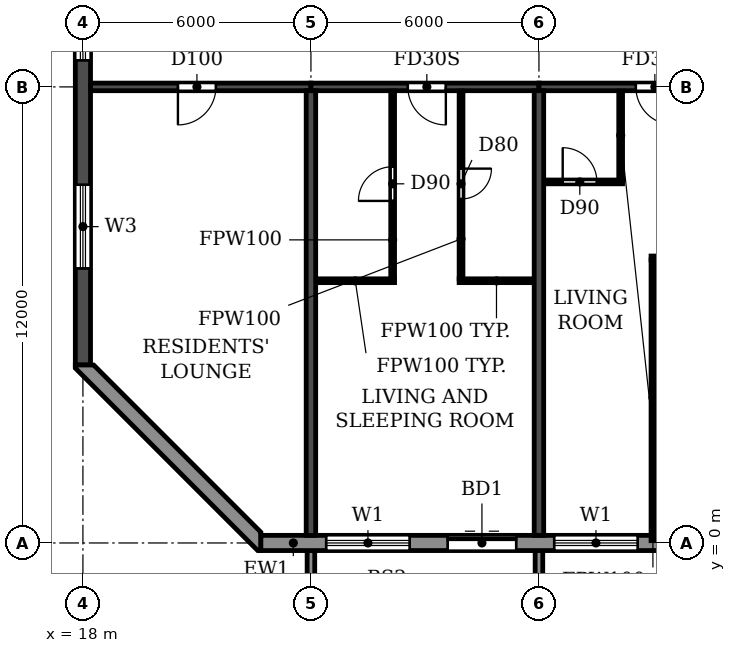
"""IFC4 building model, lengths in metres.
Left out: names, types, materials, properties, quantities, classifications, styles, units other than length and angle.
Written with IfcOpenShell. Run it as: python <this file> out.ifc"""

import sys

from ifc_helpers import new_model, si_unit, direction, frame, frame_2d, origin, place, context, subcontext, project, spatial, polyline, rectangle, outline, extrude, source, transform, mapped, element, fill, save


model = new_model("IFC4")
c1 = context("Model", 3, precision=1e-05, world=origin(), true_north=direction((0.0, 1.0)))
c2 = subcontext(c1, "Body", "Model", "MODEL_VIEW")
j1 = project(units=[si_unit("LENGTHUNIT", "METRE"), si_unit("PLANEANGLEUNIT", "RADIAN")], contexts=[c1])
p1 = place(None, origin())
s1 = spatial("IfcSite", under=j1, at=p1, CompositionType="ELEMENT")
p2 = place(p1, origin())
s2 = spatial("IfcBuilding", under=s1, at=p2, CompositionType="ELEMENT")
p3 = place(p2, frame((0.0, 0.0, 181.8)))
s3 = spatial("IfcBuildingStorey", under=s2, at=p3, CompositionType="ELEMENT", Elevation=181.8)
for number, where, z_axis, x_axis in (
    (1, (24.0, 0.2, 0.0), (0.0, 0.0, 1.0), (0.0, 1.0, 0.0)),
    (2, (30.0, 0.2, 0.0), (0.0, 0.0, 1.0), (0.0, 1.0, 0.0)),
):
    element("IfcWall", number, at=place(p3, frame(where, z_axis=z_axis, x_axis=x_axis)), inside=s3, PredefinedType="SHEAR", context=c2, shape_type="SweptSolid", body=[
        extrude(rectangle(XDim=11.7, YDim=0.25, at=frame_2d((5.85, 0.0))), origin(), (0.0, 0.0, 1.0), 3.08),
    ])
p4 = place(p3, frame((18.0, 4.683, 0.0), z_axis=(0.0, 0.0, 1.0), x_axis=(0.0, 1.0, 0.0)))
e3 = element("IfcWall", 3, at=p4, inside=s3, PredefinedType="SHEAR", context=c2, shape_type="SweptSolid", body=[
    extrude(rectangle(XDim=31.834, YDim=0.4, at=frame_2d((15.917, 0.0))), origin(), (0.0, 0.0, 1.0), 3.08),
])
p5 = place(p4, frame((23.817, 0.0, 0.9)))
e4 = element("IfcOpeningElement", 4, at=p5, cuts=e3, PredefinedType="OPENING", context=c2, shape_type="SweptSolid", body=[
    extrude(rectangle(XDim=1.2, YDim=1.5, at=frame_2d((0.6, 0.75))), frame((0.0, 0.21, 0.0), z_axis=(0.0, -1.0, 0.0), x_axis=(1.0, 0.0, 0.0)), (0.0, 0.0, 1.0), 0.42),
])
p6 = place(p4, frame((8.017, 0.0, 0.9)))
e5 = element("IfcOpeningElement", 5, at=p6, cuts=e3, PredefinedType="OPENING", context=c2, shape_type="SweptSolid", body=[
    extrude(rectangle(XDim=1.2, YDim=1.5, at=frame_2d((0.6, 0.75))), frame((0.0, 0.21, 0.0), z_axis=(0.0, -1.0, 0.0), x_axis=(1.0, 0.0, 0.0)), (0.0, 0.0, 1.0), 0.42),
])
p7 = place(p4, frame((27.694, 0.0, 0.6)))
e6 = element("IfcOpeningElement", 6, at=p7, cuts=e3, PredefinedType="OPENING", context=c2, shape_type="SweptSolid", body=[
    extrude(rectangle(XDim=2.2, YDim=1.8, at=frame_2d((1.1, 0.9))), frame((0.0, 0.21, 0.0), z_axis=(0.0, -1.0, 0.0), x_axis=(1.0, 0.0, 0.0)), (0.0, 0.0, 1.0), 0.42),
])
p8 = place(p4, frame((2.541, 0.0, 0.6)))
e7 = element("IfcOpeningElement", 7, at=p8, cuts=e3, PredefinedType="OPENING", context=c2, shape_type="SweptSolid", body=[
    extrude(rectangle(XDim=2.2, YDim=1.8, at=frame_2d((1.1, 0.9))), frame((0.0, 0.21, 0.0), z_axis=(0.0, -1.0, 0.0), x_axis=(1.0, 0.0, 0.0)), (0.0, 0.0, 1.0), 0.42),
])
p9 = place(p4, frame((15.917, 0.0, 0.9)))
e8 = element("IfcOpeningElement", 8, at=p9, cuts=e3, PredefinedType="OPENING", context=c2, shape_type="SweptSolid", body=[
    extrude(rectangle(XDim=1.2, YDim=1.5, at=frame_2d((0.6, 0.75))), frame((0.0, 0.21, 0.0), z_axis=(0.0, -1.0, 0.0), x_axis=(1.0, 0.0, 0.0)), (0.0, 0.0, 1.0), 0.42),
])
p10 = place(p3, frame((18.2, 12.0, 0.0), z_axis=(0.0, 0.0, 1.0), x_axis=(1.0, 0.0, 0.0)))
e9 = element("IfcWall", 9, at=p10, inside=s3, PredefinedType="SHEAR", context=c2, shape_type="SweptSolid", body=[
    extrude(rectangle(XDim=5.8, YDim=0.2, at=frame_2d((2.9, 0.0))), origin(), (0.0, 0.0, 1.0), 2.48),
])
p11 = place(p10, frame((2.3, 0.0, 0.0)))
e10 = element("IfcOpeningElement", 10, at=p11, cuts=e9, PredefinedType="OPENING", context=c2, shape_type="SweptSolid", body=[
    extrude(rectangle(XDim=1.0, YDim=2.1, at=frame_2d((0.5, 1.05))), frame((0.0, 0.11, 0.0), z_axis=(0.0, -1.0, 0.0), x_axis=(1.0, 0.0, 0.0)), (0.0, 0.0, 1.0), 0.22),
])
p12 = place(p3, frame((24.0, 12.0, 0.0), z_axis=(0.0, 0.0, 1.0), x_axis=(1.0, 0.0, 0.0)))
e11 = element("IfcWall", 11, at=p12, inside=s3, PredefinedType="SHEAR", context=c2, shape_type="SweptSolid", body=[
    extrude(rectangle(XDim=6.0, YDim=0.2, at=frame_2d((3.0, 0.0))), origin(), (0.0, 0.0, 1.0), 2.48),
])
p13 = place(p12, frame((2.55, 0.0, 0.0)))
e12 = element("IfcOpeningElement", 12, at=p13, cuts=e11, PredefinedType="OPENING", context=c2, shape_type="SweptSolid", body=[
    extrude(rectangle(XDim=1.0, YDim=2.1, at=frame_2d((0.5, 1.05))), frame((0.0, 0.11, 0.0), z_axis=(0.0, -1.0, 0.0), x_axis=(1.0, 0.0, 0.0)), (0.0, 0.0, 1.0), 0.22),
])
p14 = place(p3, frame((30.0, 12.0, 0.0), z_axis=(0.0, 0.0, 1.0), x_axis=(1.0, 0.0, 0.0)))
e13 = element("IfcWall", 13, at=p14, inside=s3, PredefinedType="SHEAR", context=c2, shape_type="SweptSolid", body=[
    extrude(rectangle(XDim=6.0, YDim=0.2, at=frame_2d((3.0, 0.0))), origin(), (0.0, 0.0, 1.0), 2.48),
])
p15 = place(p14, frame((2.55, 0.0, 0.0)))
e14 = element("IfcOpeningElement", 14, at=p15, cuts=e13, PredefinedType="OPENING", context=c2, shape_type="SweptSolid", body=[
    extrude(rectangle(XDim=1.0, YDim=2.1, at=frame_2d((0.5, 1.05))), frame((0.0, 0.11, 0.0), z_axis=(0.0, -1.0, 0.0), x_axis=(1.0, 0.0, 0.0)), (0.0, 0.0, 1.0), 0.22),
])
p16 = place(p3, frame((22.683, 0.0, 0.0), z_axis=(0.0, 0.0, 1.0), x_axis=(1.0, 0.0, 0.0)))
e15 = element("IfcWall", 15, at=p16, inside=s3, PredefinedType="STANDARD", context=c2, shape_type="SweptSolid", body=[
    extrude(rectangle(XDim=56.634, YDim=0.4, at=frame_2d((28.317, 0.0))), origin(), (0.0, 0.0, 1.0), 3.08),
])
p17 = place(p16, frame((1.717, 0.0, 0.9)))
e16 = element("IfcOpeningElement", 16, at=p17, cuts=e15, PredefinedType="OPENING", context=c2, shape_type="SweptSolid", body=[
    extrude(rectangle(XDim=2.2, YDim=1.5, at=frame_2d((1.1, 0.75))), frame((0.0, 0.21, 0.0), z_axis=(0.0, -1.0, 0.0), x_axis=(1.0, 0.0, 0.0)), (0.0, 0.0, 1.0), 0.42),
])
p18 = place(p16, frame((4.917, 0.0, 0.0)))
e17 = element("IfcOpeningElement", 17, at=p18, cuts=e15, PredefinedType="OPENING", context=c2, shape_type="SweptSolid", body=[
    extrude(rectangle(XDim=1.8, YDim=2.4, at=frame_2d((0.9, 1.2))), frame((0.0, 0.21, 0.0), z_axis=(0.0, -1.0, 0.0), x_axis=(1.0, 0.0, 0.0)), (0.0, 0.0, 1.0), 0.42),
])
p19 = place(p16, frame((7.717, 0.0, 0.9)))
e18 = element("IfcOpeningElement", 18, at=p19, cuts=e15, PredefinedType="OPENING", context=c2, shape_type="SweptSolid", body=[
    extrude(rectangle(XDim=2.2, YDim=1.5, at=frame_2d((1.1, 0.75))), frame((0.0, 0.21, 0.0), z_axis=(0.0, -1.0, 0.0), x_axis=(1.0, 0.0, 0.0)), (0.0, 0.0, 1.0), 0.42),
])
p20 = place(p16, frame((10.717, 0.0, 0.9)))
e19 = element("IfcOpeningElement", 19, at=p20, cuts=e15, PredefinedType="OPENING", context=c2, shape_type="SweptSolid", body=[
    extrude(rectangle(XDim=2.2, YDim=1.5, at=frame_2d((1.1, 0.75))), frame((0.0, 0.21, 0.0), z_axis=(0.0, -1.0, 0.0), x_axis=(1.0, 0.0, 0.0)), (0.0, 0.0, 1.0), 0.42),
])
p21 = place(p16, frame((13.717, 0.0, 0.9)))
e20 = element("IfcOpeningElement", 20, at=p21, cuts=e15, PredefinedType="OPENING", context=c2, shape_type="SweptSolid", body=[
    extrude(rectangle(XDim=2.2, YDim=1.5, at=frame_2d((1.1, 0.75))), frame((0.0, 0.21, 0.0), z_axis=(0.0, -1.0, 0.0), x_axis=(1.0, 0.0, 0.0)), (0.0, 0.0, 1.0), 0.42),
])
p22 = place(p16, frame((16.717, 0.0, 0.9)))
e21 = element("IfcOpeningElement", 21, at=p22, cuts=e15, PredefinedType="OPENING", context=c2, shape_type="SweptSolid", body=[
    extrude(rectangle(XDim=2.2, YDim=1.5, at=frame_2d((1.1, 0.75))), frame((0.0, 0.21, 0.0), z_axis=(0.0, -1.0, 0.0), x_axis=(1.0, 0.0, 0.0)), (0.0, 0.0, 1.0), 0.42),
])
p23 = place(p16, frame((19.717, 0.0, 0.9)))
e22 = element("IfcOpeningElement", 22, at=p23, cuts=e15, PredefinedType="OPENING", context=c2, shape_type="SweptSolid", body=[
    extrude(rectangle(XDim=2.2, YDim=1.5, at=frame_2d((1.1, 0.75))), frame((0.0, 0.21, 0.0), z_axis=(0.0, -1.0, 0.0), x_axis=(1.0, 0.0, 0.0)), (0.0, 0.0, 1.0), 0.42),
])
p24 = place(p16, frame((22.717, 0.0, 0.9)))
e23 = element("IfcOpeningElement", 23, at=p24, cuts=e15, PredefinedType="OPENING", context=c2, shape_type="SweptSolid", body=[
    extrude(rectangle(XDim=2.2, YDim=1.5, at=frame_2d((1.1, 0.75))), frame((0.0, 0.21, 0.0), z_axis=(0.0, -1.0, 0.0), x_axis=(1.0, 0.0, 0.0)), (0.0, 0.0, 1.0), 0.42),
])
p25 = place(p16, frame((25.717, 0.0, 0.9)))
e24 = element("IfcOpeningElement", 24, at=p25, cuts=e15, PredefinedType="OPENING", context=c2, shape_type="SweptSolid", body=[
    extrude(rectangle(XDim=2.2, YDim=1.5, at=frame_2d((1.1, 0.75))), frame((0.0, 0.21, 0.0), z_axis=(0.0, -1.0, 0.0), x_axis=(1.0, 0.0, 0.0)), (0.0, 0.0, 1.0), 0.42),
])
p26 = place(p16, frame((28.717, 0.0, 0.9)))
e25 = element("IfcOpeningElement", 25, at=p26, cuts=e15, PredefinedType="OPENING", context=c2, shape_type="SweptSolid", body=[
    extrude(rectangle(XDim=2.2, YDim=1.5, at=frame_2d((1.1, 0.75))), frame((0.0, 0.21, 0.0), z_axis=(0.0, -1.0, 0.0), x_axis=(1.0, 0.0, 0.0)), (0.0, 0.0, 1.0), 0.42),
])
p27 = place(p16, frame((31.717, 0.0, 0.9)))
e26 = element("IfcOpeningElement", 26, at=p27, cuts=e15, PredefinedType="OPENING", context=c2, shape_type="SweptSolid", body=[
    extrude(rectangle(XDim=2.2, YDim=1.5, at=frame_2d((1.1, 0.75))), frame((0.0, 0.21, 0.0), z_axis=(0.0, -1.0, 0.0), x_axis=(1.0, 0.0, 0.0)), (0.0, 0.0, 1.0), 0.42),
])
p28 = place(p16, frame((34.717, 0.0, 0.9)))
e27 = element("IfcOpeningElement", 27, at=p28, cuts=e15, PredefinedType="OPENING", context=c2, shape_type="SweptSolid", body=[
    extrude(rectangle(XDim=2.2, YDim=1.5, at=frame_2d((1.1, 0.75))), frame((0.0, 0.21, 0.0), z_axis=(0.0, -1.0, 0.0), x_axis=(1.0, 0.0, 0.0)), (0.0, 0.0, 1.0), 0.42),
])
p29 = place(p16, frame((37.917, 0.0, 0.0)))
e28 = element("IfcOpeningElement", 28, at=p29, cuts=e15, PredefinedType="OPENING", context=c2, shape_type="SweptSolid", body=[
    extrude(rectangle(XDim=1.8, YDim=2.4, at=frame_2d((0.9, 1.2))), frame((0.0, 0.21, 0.0), z_axis=(0.0, -1.0, 0.0), x_axis=(1.0, 0.0, 0.0)), (0.0, 0.0, 1.0), 0.42),
])
p30 = place(p16, frame((40.717, 0.0, 0.9)))
e29 = element("IfcOpeningElement", 29, at=p30, cuts=e15, PredefinedType="OPENING", context=c2, shape_type="SweptSolid", body=[
    extrude(rectangle(XDim=2.2, YDim=1.5, at=frame_2d((1.1, 0.75))), frame((0.0, 0.21, 0.0), z_axis=(0.0, -1.0, 0.0), x_axis=(1.0, 0.0, 0.0)), (0.0, 0.0, 1.0), 0.42),
])
p31 = place(p16, frame((43.717, 0.0, 0.9)))
e30 = element("IfcOpeningElement", 30, at=p31, cuts=e15, PredefinedType="OPENING", context=c2, shape_type="SweptSolid", body=[
    extrude(rectangle(XDim=2.2, YDim=1.5, at=frame_2d((1.1, 0.75))), frame((0.0, 0.21, 0.0), z_axis=(0.0, -1.0, 0.0), x_axis=(1.0, 0.0, 0.0)), (0.0, 0.0, 1.0), 0.42),
])
p32 = place(p16, frame((46.717, 0.0, 0.9)))
e31 = element("IfcOpeningElement", 31, at=p32, cuts=e15, PredefinedType="OPENING", context=c2, shape_type="SweptSolid", body=[
    extrude(rectangle(XDim=2.2, YDim=1.5, at=frame_2d((1.1, 0.75))), frame((0.0, 0.21, 0.0), z_axis=(0.0, -1.0, 0.0), x_axis=(1.0, 0.0, 0.0)), (0.0, 0.0, 1.0), 0.42),
])
p33 = place(p16, frame((49.917, 0.0, 0.0)))
e32 = element("IfcOpeningElement", 32, at=p33, cuts=e15, PredefinedType="OPENING", context=c2, shape_type="SweptSolid", body=[
    extrude(rectangle(XDim=1.8, YDim=2.4, at=frame_2d((0.9, 1.2))), frame((0.0, 0.21, 0.0), z_axis=(0.0, -1.0, 0.0), x_axis=(1.0, 0.0, 0.0)), (0.0, 0.0, 1.0), 0.42),
])
p34 = place(p16, frame((52.717, 0.0, 0.9)))
e33 = element("IfcOpeningElement", 33, at=p34, cuts=e15, PredefinedType="OPENING", context=c2, shape_type="SweptSolid", body=[
    extrude(rectangle(XDim=2.2, YDim=1.5, at=frame_2d((1.1, 0.75))), frame((0.0, 0.21, 0.0), z_axis=(0.0, -1.0, 0.0), x_axis=(1.0, 0.0, 0.0)), (0.0, 0.0, 1.0), 0.42),
])
p35 = place(p3, origin())
e34 = element("IfcWall", 34, at=p35, inside=s3, PredefinedType="STANDARD", context=c2, shape_type="SweptSolid", body=[
    extrude(outline(polyline([(17.8, 4.683), (17.8, 4.6), (22.6, -0.2), (22.683, -0.2), (22.683, 0.283), (18.283, 4.683), (17.8, 4.683)])), origin(), (0.0, 0.0, 1.0), 3.08),
])
m1 = source(origin(), c2, "Body", "SweptSolid", [
    extrude(outline(polyline([(0.0, 0.0), (0.2, 0.0), (0.2, 1.65), (0.0, 1.65), (0.0, 0.0)])), origin(), (0.0, 0.0, 1.0), 3.1),
])
for number, where in (
    (35, (23.9, -1.85, 0.0)),
    (36, (29.9, -1.85, 0.0)),
):
    element("IfcWall", number, at=place(p3, frame(where)), inside=s3, PredefinedType="STANDARD", context=c2, shape_type="MappedRepresentation", body=[
        mapped(m1, transform((0.0, 0.0, 0.0))),
    ])
p36 = place(p3, frame((24.135, 6.9, 0.0), z_axis=(0.0, 0.0, 1.0), x_axis=(1.0, 0.0, 0.0)))
e37 = element("IfcWall", 37, at=p36, inside=s3, PredefinedType="PARTITIONING", context=c2, shape_type="SweptSolid", body=[
    extrude(rectangle(XDim=2.065, YDim=0.1, at=frame_2d((1.032, 0.0))), origin(), (0.0, 0.0, 1.0), 3.08),
])
p37 = place(p3, frame((27.9, 6.9, 0.0), z_axis=(0.0, 0.0, 1.0), x_axis=(1.0, 0.0, 0.0)))
e38 = element("IfcWall", 38, at=p37, inside=s3, PredefinedType="PARTITIONING", context=c2, shape_type="SweptSolid", body=[
    extrude(rectangle(XDim=1.965, YDim=0.1, at=frame_2d((0.982, 0.0))), origin(), (0.0, 0.0, 1.0), 3.08),
])
p38 = place(p3, frame((32.95, 7.5, 0.0), z_axis=(0.0, 0.0, 1.0), x_axis=(1.0, 0.0, 0.0)))
e39 = element("IfcWall", 39, at=p38, inside=s3, PredefinedType="PARTITIONING", context=c2, shape_type="SweptSolid", body=[
    extrude(rectangle(XDim=2.915, YDim=0.1, at=frame_2d((1.458, 0.0))), origin(), (0.0, 0.0, 1.0), 3.08),
])
p39 = place(p38, frame((1.65, 0.0, 0.0)))
e40 = element("IfcOpeningElement", 40, at=p39, cuts=e39, PredefinedType="OPENING", context=c2, shape_type="SweptSolid", body=[
    extrude(rectangle(XDim=0.9, YDim=2.1, at=frame_2d((0.45, 1.05))), frame((0.0, 0.06, 0.0), z_axis=(0.0, -1.0, 0.0), x_axis=(1.0, 0.0, 0.0)), (0.0, 0.0, 1.0), 0.12),
])
p40 = place(p3, frame((30.135, 9.5, 0.0), z_axis=(0.0, 0.0, 1.0), x_axis=(1.0, 0.0, 0.0)))
e41 = element("IfcWall", 41, at=p40, inside=s3, PredefinedType="PARTITIONING", context=c2, shape_type="SweptSolid", body=[
    extrude(rectangle(XDim=2.065, YDim=0.1, at=frame_2d((1.032, 0.0))), origin(), (0.0, 0.0, 1.0), 3.08),
])
p41 = place(p40, frame((0.49, 0.0, 0.0)))
e42 = element("IfcOpeningElement", 42, at=p41, cuts=e41, PredefinedType="OPENING", context=c2, shape_type="SweptSolid", body=[
    extrude(rectangle(XDim=0.9, YDim=2.1, at=frame_2d((0.45, 1.05))), frame((0.0, 0.06, 0.0), z_axis=(0.0, -1.0, 0.0), x_axis=(1.0, 0.0, 0.0)), (0.0, 0.0, 1.0), 0.12),
])
p42 = place(p3, frame((26.15, 6.95, 0.0), z_axis=(0.0, 0.0, 1.0), x_axis=(0.0, 1.0, 0.0)))
e43 = element("IfcWall", 43, at=p42, inside=s3, PredefinedType="PARTITIONING", context=c2, shape_type="SweptSolid", body=[
    extrude(rectangle(XDim=4.94, YDim=0.1, at=frame_2d((2.47, 0.0))), origin(), (0.0, 0.0, 1.0), 3.08),
])
p43 = place(p42, frame((2.05, 0.0, 0.0)))
e44 = element("IfcOpeningElement", 44, at=p43, cuts=e43, PredefinedType="OPENING", context=c2, shape_type="SweptSolid", body=[
    extrude(rectangle(XDim=0.9, YDim=2.1, at=frame_2d((0.45, 1.05))), frame((0.0, 0.06, 0.0), z_axis=(0.0, -1.0, 0.0), x_axis=(1.0, 0.0, 0.0)), (0.0, 0.0, 1.0), 0.12),
])
p44 = place(p3, frame((27.95, 6.95, 0.0), z_axis=(0.0, 0.0, 1.0), x_axis=(0.0, 1.0, 0.0)))
e45 = element("IfcWall", 45, at=p44, inside=s3, PredefinedType="PARTITIONING", context=c2, shape_type="SweptSolid", body=[
    extrude(rectangle(XDim=4.94, YDim=0.1, at=frame_2d((2.47, 0.0))), origin(), (0.0, 0.0, 1.0), 3.08),
])
p45 = place(p44, frame((2.1, 0.0, 0.0)))
e46 = element("IfcOpeningElement", 46, at=p45, cuts=e45, PredefinedType="OPENING", context=c2, shape_type="SweptSolid", body=[
    extrude(rectangle(XDim=0.8, YDim=2.1, at=frame_2d((0.4, 1.05))), frame((0.0, 0.06, 0.0), z_axis=(0.0, -1.0, 0.0), x_axis=(1.0, 0.0, 0.0)), (0.0, 0.0, 1.0), 0.12),
])
p46 = place(p3, frame((32.15, 9.55, 0.0), z_axis=(0.0, 0.0, 1.0), x_axis=(0.0, 1.0, 0.0)))
e47 = element("IfcWall", 47, at=p46, inside=s3, PredefinedType="PARTITIONING", context=c2, shape_type="SweptSolid", body=[
    extrude(rectangle(XDim=2.34, YDim=0.1, at=frame_2d((1.17, 0.0))), origin(), (0.0, 0.0, 1.0), 3.08),
])
p47 = place(p3, frame((33.0, 0.06, 0.0), z_axis=(0.0, 0.0, 1.0), x_axis=(0.0, 1.0, 0.0)))
e48 = element("IfcWall", 48, at=p47, inside=s3, PredefinedType="PARTITIONING", context=c2, shape_type="SweptSolid", body=[
    extrude(rectangle(XDim=7.39, YDim=0.1, at=frame_2d((3.695, 0.0))), origin(), (0.0, 0.0, 1.0), 3.08),
])
p48 = place(p17, origin())
e49 = element("IfcWindow", 49, at=p48, inside=s3, PartitioningType="DOUBLE_PANEL_HORIZONTAL", PredefinedType="WINDOW", context=c2, shape_type="SweptSolid", body=[
    extrude(rectangle(XDim=2.2, YDim=1.5, at=frame_2d((1.1, 0.75))), frame((0.0, 0.03, 0.0), z_axis=(0.0, -1.0, 0.0), x_axis=(1.0, 0.0, 0.0)), (0.0, 0.0, 1.0), 0.06),
])
fill(e16, e49)
p49 = place(p18, origin())
e50 = element("IfcDoor", 50, at=p49, inside=s3, OperationType="DOUBLE_DOOR_SLIDING", PredefinedType="DOOR", context=c2, shape_type="SweptSolid", body=[
    extrude(rectangle(XDim=1.8, YDim=2.4, at=frame_2d((0.9, 1.2))), frame((0.0, 0.025, 0.0), z_axis=(0.0, -1.0, 0.0), x_axis=(1.0, 0.0, 0.0)), (0.0, 0.0, 1.0), 0.05),
])
fill(e17, e50)
p50 = place(p19, origin())
e51 = element("IfcWindow", 51, at=p50, inside=s3, PartitioningType="DOUBLE_PANEL_HORIZONTAL", PredefinedType="WINDOW", context=c2, shape_type="SweptSolid", body=[
    extrude(rectangle(XDim=2.2, YDim=1.5, at=frame_2d((1.1, 0.75))), frame((0.0, 0.03, 0.0), z_axis=(0.0, -1.0, 0.0), x_axis=(1.0, 0.0, 0.0)), (0.0, 0.0, 1.0), 0.06),
])
fill(e18, e51)
p51 = place(p6, origin())
e52 = element("IfcWindow", 52, at=p51, inside=s3, PartitioningType="SINGLE_PANEL", PredefinedType="WINDOW", context=c2, shape_type="SweptSolid", body=[
    extrude(rectangle(XDim=1.2, YDim=1.5, at=frame_2d((0.6, 0.75))), frame((0.0, 0.03, 0.0), z_axis=(0.0, -1.0, 0.0), x_axis=(1.0, 0.0, 0.0)), (0.0, 0.0, 1.0), 0.06),
])
fill(e5, e52)
p52 = place(p8, origin())
e53 = element("IfcWindow", 53, at=p52, inside=s3, PartitioningType="DOUBLE_PANEL_HORIZONTAL", PredefinedType="WINDOW", context=c2, shape_type="SweptSolid", body=[
    extrude(rectangle(XDim=2.2, YDim=1.8, at=frame_2d((1.1, 0.9))), frame((0.0, 0.03, 0.0), z_axis=(0.0, -1.0, 0.0), x_axis=(1.0, 0.0, 0.0)), (0.0, 0.0, 1.0), 0.06),
])
fill(e7, e53)
p53 = place(p11, frame((1.0, 0.0, 0.0), z_axis=(0.0, 0.0, 1.0), x_axis=(-1.0, 0.0, 0.0)))
e54 = element("IfcDoor", 54, at=p53, inside=s3, OperationType="SINGLE_SWING_RIGHT", PredefinedType="DOOR", context=c2, shape_type="SweptSolid", body=[
    extrude(rectangle(XDim=1.0, YDim=2.1, at=frame_2d((0.5, 1.05))), frame((0.0, 0.025, 0.0), z_axis=(0.0, -1.0, 0.0), x_axis=(1.0, 0.0, 0.0)), (0.0, 0.0, 1.0), 0.05),
])
fill(e10, e54)
p54 = place(p43, origin())
e55 = element("IfcDoor", 55, at=p54, inside=s3, OperationType="SINGLE_SWING_LEFT", PredefinedType="DOOR", context=c2, shape_type="SweptSolid", body=[
    extrude(rectangle(XDim=0.9, YDim=2.1, at=frame_2d((0.45, 1.05))), frame((0.0, 0.025, 0.0), z_axis=(0.0, -1.0, 0.0), x_axis=(1.0, 0.0, 0.0)), (0.0, 0.0, 1.0), 0.05),
])
fill(e44, e55)
p55 = place(p13, frame((1.0, 0.0, 0.0), z_axis=(0.0, 0.0, 1.0), x_axis=(-1.0, 0.0, 0.0)))
e56 = element("IfcDoor", 56, at=p55, inside=s3, OperationType="SINGLE_SWING_LEFT", PredefinedType="DOOR", context=c2, shape_type="SweptSolid", body=[
    extrude(rectangle(XDim=1.0, YDim=2.1, at=frame_2d((0.5, 1.05))), frame((0.0, 0.025, 0.0), z_axis=(0.0, -1.0, 0.0), x_axis=(1.0, 0.0, 0.0)), (0.0, 0.0, 1.0), 0.05),
])
fill(e12, e56)
p56 = place(p45, frame((0.8, 0.0, 0.0), z_axis=(0.0, 0.0, 1.0), x_axis=(-1.0, 0.0, 0.0)))
e57 = element("IfcDoor", 57, at=p56, inside=s3, OperationType="SINGLE_SWING_LEFT", PredefinedType="DOOR", context=c2, shape_type="SweptSolid", body=[
    extrude(rectangle(XDim=0.8, YDim=2.1, at=frame_2d((0.4, 1.05))), frame((0.0, 0.025, 0.0), z_axis=(0.0, -1.0, 0.0), x_axis=(1.0, 0.0, 0.0)), (0.0, 0.0, 1.0), 0.05),
])
fill(e46, e57)
p57 = place(p41, origin())
e58 = element("IfcDoor", 58, at=p57, inside=s3, OperationType="SINGLE_SWING_LEFT", PredefinedType="DOOR", context=c2, shape_type="SweptSolid", body=[
    extrude(rectangle(XDim=0.9, YDim=2.1, at=frame_2d((0.45, 1.05))), frame((0.0, 0.025, 0.0), z_axis=(0.0, -1.0, 0.0), x_axis=(1.0, 0.0, 0.0)), (0.0, 0.0, 1.0), 0.05),
])
fill(e42, e58)
p58 = place(p15, frame((1.0, 0.0, 0.0), z_axis=(0.0, 0.0, 1.0), x_axis=(-1.0, 0.0, 0.0)))
e59 = element("IfcDoor", 59, at=p58, inside=s3, OperationType="SINGLE_SWING_LEFT", PredefinedType="DOOR", context=c2, shape_type="SweptSolid", body=[
    extrude(rectangle(XDim=1.0, YDim=2.1, at=frame_2d((0.5, 1.05))), frame((0.0, 0.025, 0.0), z_axis=(0.0, -1.0, 0.0), x_axis=(1.0, 0.0, 0.0)), (0.0, 0.0, 1.0), 0.05),
])
fill(e14, e59)
save(model, sys.argv[1])
